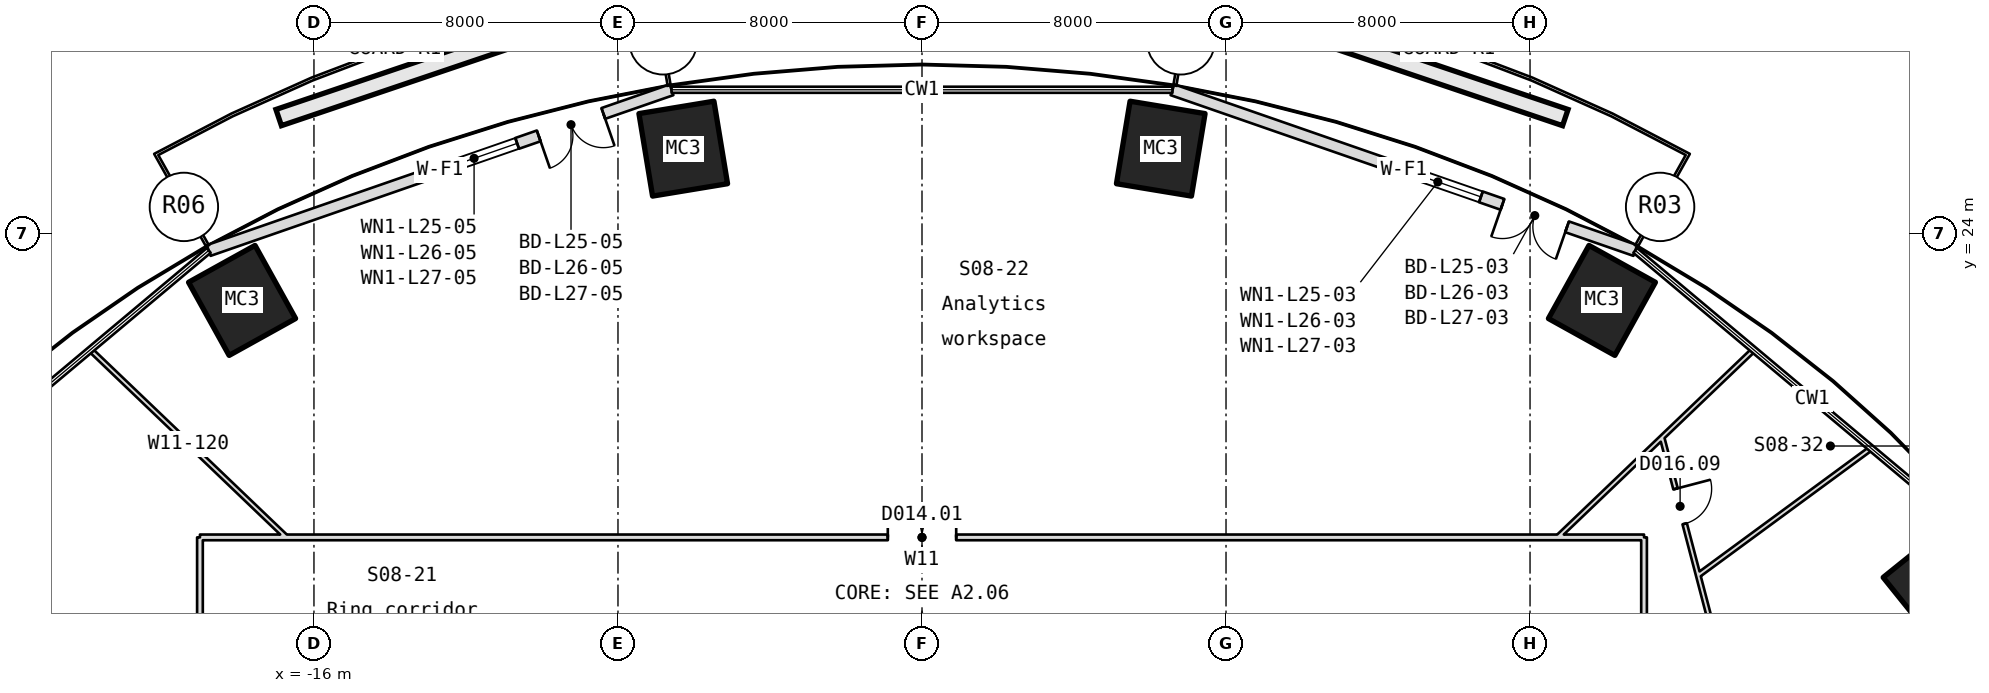
"""IFC4 building model, lengths in metres.
Left out: names, types, materials, properties, quantities, classifications, styles, units other than length and angle.
Written with IfcOpenShell. Run it as: python <this file> out.ifc"""

import sys

from ifc_helpers import new_model, si_unit, direction, frame, frame_2d, origin, origin_2d, place, context, subcontext, project, spatial, rectangle, hollow_rectangle, extrude, element, fill, save


model = new_model("IFC4")
c1 = context("Model", 3, precision=1e-05, world=origin(), true_north=direction((0.0, 1.0)))
c2 = subcontext(c1, "Body", "Model", "MODEL_VIEW")
j1 = project(units=[si_unit("LENGTHUNIT", "METRE"), si_unit("PLANEANGLEUNIT", "RADIAN")], contexts=[c1])
p1 = place(None, origin())
s1 = spatial("IfcSite", under=j1, at=p1, CompositionType="ELEMENT")
p2 = place(p1, origin())
s2 = spatial("IfcBuilding", under=s1, at=p2, CompositionType="ELEMENT")
p3 = place(p2, frame((0.0, 0.0, 120.15)))
s3 = spatial("IfcBuildingStorey", under=s2, at=p3, CompositionType="ELEMENT", Elevation=120.15)
for number, where, z_axis, x_axis in (
    (1, (26.777, 14.857, -0.18), (0.0, 0.0, 1.0), (0.627, -0.779, 0.0)),
    (2, (17.892, 22.235, -0.18), (0.0, 0.0, 1.0), (0.874, -0.485, 0.0)),
    (3, (6.283, 26.228, -0.18), (0.0, 0.0, 1.0), (0.987, -0.163, 0.0)),
    (4, (-6.283, 26.228, -0.18), (0.0, 0.0, 1.0), (0.987, 0.163, 0.0)),
    (5, (-17.892, 22.235, -0.18), (0.0, 0.0, 1.0), (0.874, 0.485, 0.0)),
):
    element("IfcColumn", number, at=place(p3, frame(where, z_axis=z_axis, x_axis=x_axis)), inside=s3, PredefinedType="COLUMN", context=c2, shape_type="SweptSolid", body=[
        extrude(hollow_rectangle(XDim=2.0, YDim=2.2, WallThickness=0.08, at=origin_2d()), origin(), (0.0, 0.0, 1.0), 4.15),
    ])
p4 = place(p3, frame((18.769, 23.549, 0.0), z_axis=(0.0, 0.0, 1.0), x_axis=(-0.944664780262, 0.328037273694, 0.0)))
e6 = element("IfcWall", 6, at=p4, inside=s3, PredefinedType="SOLIDWALL", context=c2, shape_type="SweptSolid", body=[
    extrude(rectangle(XDim=12.892, YDim=0.3, at=frame_2d((6.446, 0.0))), origin(), (0.0, 0.0, 1.0), 3.97),
])
p5 = place(p4, frame((1.9, 0.0, 0.0)))
e7 = element("IfcOpeningElement", 7, at=p5, cuts=e6, PredefinedType="OPENING", context=c2, shape_type="SweptSolid", body=[
    extrude(rectangle(XDim=1.8, YDim=2.4, at=frame_2d((0.9, 1.2))), frame((0.0, 0.16, 0.0), z_axis=(0.0, -1.0, 0.0), x_axis=(1.0, 0.0, 0.0)), (0.0, 0.0, 1.0), 0.32),
])
p6 = place(p4, frame((4.3, 0.0, 0.9)))
e8 = element("IfcOpeningElement", 8, at=p6, cuts=e6, PredefinedType="OPENING", context=c2, shape_type="SweptSolid", body=[
    extrude(rectangle(XDim=2.4, YDim=1.5, at=frame_2d((1.2, 0.75))), frame((0.0, 0.16, 0.0), z_axis=(0.0, -1.0, 0.0), x_axis=(1.0, 0.0, 0.0)), (0.0, 0.0, 1.0), 0.32),
])
p7 = place(p3, frame((-6.591, 27.778, 0.0), z_axis=(0.0, 0.0, 1.0), x_axis=(-0.944664780262, -0.328037273694, 0.0)))
e9 = element("IfcWall", 9, at=p7, inside=s3, PredefinedType="SOLIDWALL", context=c2, shape_type="SweptSolid", body=[
    extrude(rectangle(XDim=12.892, YDim=0.3, at=frame_2d((6.446, 0.0))), origin(), (0.0, 0.0, 1.0), 3.97),
])
p8 = place(p7, frame((1.9, 0.0, 0.0)))
e10 = element("IfcOpeningElement", 10, at=p8, cuts=e9, PredefinedType="OPENING", context=c2, shape_type="SweptSolid", body=[
    extrude(rectangle(XDim=1.8, YDim=2.4, at=frame_2d((0.9, 1.2))), frame((0.0, 0.16, 0.0), z_axis=(0.0, -1.0, 0.0), x_axis=(1.0, 0.0, 0.0)), (0.0, 0.0, 1.0), 0.32),
])
p9 = place(p7, frame((4.3, 0.0, 0.9)))
e11 = element("IfcOpeningElement", 11, at=p9, cuts=e9, PredefinedType="OPENING", context=c2, shape_type="SweptSolid", body=[
    extrude(rectangle(XDim=2.4, YDim=1.5, at=frame_2d((1.2, 0.75))), frame((0.0, 0.16, 0.0), z_axis=(0.0, -1.0, 0.0), x_axis=(1.0, 0.0, 0.0)), (0.0, 0.0, 1.0), 0.32),
])
p10 = place(p3, frame((-19.0, -16.0, 0.0), z_axis=(0.0, 0.0, 1.0), x_axis=(0.0, 1.0, 0.0)))
e12 = element("IfcWall", 12, at=p10, inside=s3, PredefinedType="PARTITIONING", context=c2, shape_type="SweptSolid", body=[
    extrude(rectangle(XDim=32.0, YDim=0.15, at=frame_2d((16.0, 0.0))), origin(), (0.0, 0.0, 1.0), 3.97),
])
p11 = place(p3, frame((-19.0, 16.0, 0.0), z_axis=(0.0, 0.0, 1.0), x_axis=(1.0, 0.0, 0.0)))
e13 = element("IfcWall", 13, at=p11, inside=s3, PredefinedType="PARTITIONING", context=c2, shape_type="SweptSolid", body=[
    extrude(rectangle(XDim=38.0, YDim=0.15, at=frame_2d((19.0, 0.0))), origin(), (0.0, 0.0, 1.0), 3.97),
])
p12 = place(p11, frame((18.1, 0.0, 0.0)))
e14 = element("IfcOpeningElement", 14, at=p12, cuts=e13, PredefinedType="OPENING", context=c2, shape_type="SweptSolid", body=[
    extrude(rectangle(XDim=1.8, YDim=2.1, at=frame_2d((0.9, 1.05))), frame((0.0, 0.085, 0.0), z_axis=(0.0, -1.0, 0.0), x_axis=(1.0, 0.0, 0.0)), (0.0, 0.0, 1.0), 0.17),
])
p13 = place(p3, frame((-16.723, 16.0, 0.0), z_axis=(0.0, 0.0, 1.0), x_axis=(-0.722571333341, 0.691296367872, 0.0)))
e15 = element("IfcWall", 15, at=p13, inside=s3, PredefinedType="PARTITIONING", context=c2, shape_type="SweptSolid", body=[
    extrude(rectangle(XDim=7.143, YDim=0.12, at=frame_2d((3.571, 0.0))), origin(), (0.0, 0.0, 1.0), 3.97),
])
p14 = place(p3, frame((16.723, 16.0, 0.0), z_axis=(0.0, 0.0, 1.0), x_axis=(0.722554998294, 0.69131344153, 0.0)))
e16 = element("IfcWall", 16, at=p14, inside=s3, PredefinedType="PARTITIONING", context=c2, shape_type="SweptSolid", body=[
    extrude(rectangle(XDim=7.143, YDim=0.12, at=frame_2d((3.571, 0.0))), origin(), (0.0, 0.0, 1.0), 3.97),
])
p15 = place(p3, frame((19.0, 16.0, 0.0), z_axis=(0.0, 0.0, 1.0), x_axis=(0.0, -1.0, 0.0)))
e17 = element("IfcWall", 17, at=p15, inside=s3, PredefinedType="PARTITIONING", context=c2, shape_type="SweptSolid", body=[
    extrude(rectangle(XDim=32.0, YDim=0.15, at=frame_2d((16.0, 0.0))), origin(), (0.0, 0.0, 1.0), 3.97),
])
p16 = place(p15, frame((25.851, 0.0, 0.0)))
e18 = element("IfcOpeningElement", 18, at=p16, cuts=e17, PredefinedType="OPENING", context=c2, shape_type="SweptSolid", body=[
    extrude(rectangle(XDim=0.95, YDim=2.1, at=frame_2d((0.475, 1.05))), frame((0.0, 0.085, 0.0), z_axis=(0.0, -1.0, 0.0), x_axis=(1.0, 0.0, 0.0)), (0.0, 0.0, 1.0), 0.17),
])
p17 = place(p15, frame((21.755, 0.0, 0.0)))
e19 = element("IfcOpeningElement", 19, at=p17, cuts=e17, PredefinedType="OPENING", context=c2, shape_type="SweptSolid", body=[
    extrude(rectangle(XDim=0.95, YDim=2.1, at=frame_2d((0.475, 1.05))), frame((0.0, 0.085, 0.0), z_axis=(0.0, -1.0, 0.0), x_axis=(1.0, 0.0, 0.0)), (0.0, 0.0, 1.0), 0.17),
])
p18 = place(p15, frame((9.358, 0.0, 0.0)))
e20 = element("IfcOpeningElement", 20, at=p18, cuts=e17, PredefinedType="OPENING", context=c2, shape_type="SweptSolid", body=[
    extrude(rectangle(XDim=1.8, YDim=2.1, at=frame_2d((0.9, 1.05))), frame((0.0, 0.085, 0.0), z_axis=(0.0, -1.0, 0.0), x_axis=(1.0, 0.0, 0.0)), (0.0, 0.0, 1.0), 0.17),
])
p19 = place(p3, frame((24.976, 18.346, 0.0), z_axis=(0.0, 0.0, 1.0), x_axis=(-0.805952536967, -0.591980158583, 0.0)))
e21 = element("IfcWall", 21, at=p19, inside=s3, PredefinedType="PARTITIONING", context=c2, shape_type="SweptSolid", body=[
    extrude(rectangle(XDim=5.647, YDim=0.12, at=frame_2d((2.823, 0.0))), origin(), (0.0, 0.0, 1.0), 3.97),
])
p20 = place(p3, frame((25.979, -6.173, 0.0), z_axis=(0.0, 0.0, 1.0), x_axis=(-0.253695602942, 0.967284105652, 0.0)))
e22 = element("IfcWall", 22, at=p20, inside=s3, PredefinedType="PARTITIONING", context=c2, shape_type="SweptSolid", body=[
    extrude(rectangle(XDim=25.643, YDim=0.12, at=frame_2d((12.822, 0.0))), origin(), (0.0, 0.0, 1.0), 3.97),
])
p21 = place(p20, frame((3.402, 0.0, 0.0)))
e23 = element("IfcOpeningElement", 23, at=p21, cuts=e22, PredefinedType="OPENING", context=c2, shape_type="SweptSolid", body=[
    extrude(rectangle(XDim=0.95, YDim=2.1, at=frame_2d((0.475, 1.05))), frame((0.0, 0.07, 0.0), z_axis=(0.0, -1.0, 0.0), x_axis=(1.0, 0.0, 0.0)), (0.0, 0.0, 1.0), 0.14),
])
p22 = place(p20, frame((9.992, 0.0, 0.0)))
e24 = element("IfcOpeningElement", 24, at=p22, cuts=e22, PredefinedType="OPENING", context=c2, shape_type="SweptSolid", body=[
    extrude(rectangle(XDim=0.95, YDim=2.1, at=frame_2d((0.475, 1.05))), frame((0.0, 0.07, 0.0), z_axis=(0.0, -1.0, 0.0), x_axis=(1.0, 0.0, 0.0)), (0.0, 0.0, 1.0), 0.14),
])
p23 = place(p20, frame((17.061, 0.0, 0.0)))
e25 = element("IfcOpeningElement", 25, at=p23, cuts=e22, PredefinedType="OPENING", context=c2, shape_type="SweptSolid", body=[
    extrude(rectangle(XDim=0.95, YDim=2.1, at=frame_2d((0.475, 1.05))), frame((0.0, 0.07, 0.0), z_axis=(0.0, -1.0, 0.0), x_axis=(1.0, 0.0, 0.0)), (0.0, 0.0, 1.0), 0.14),
])
p24 = place(p20, frame((23.293, 0.0, 0.0)))
e26 = element("IfcOpeningElement", 26, at=p24, cuts=e22, PredefinedType="OPENING", context=c2, shape_type="SweptSolid", body=[
    extrude(rectangle(XDim=0.95, YDim=2.1, at=frame_2d((0.475, 1.05))), frame((0.0, 0.07, 0.0), z_axis=(0.0, -1.0, 0.0), x_axis=(1.0, 0.0, 0.0)), (0.0, 0.0, 1.0), 0.14),
])
p25 = place(p5, origin())
e27 = element("IfcDoor", 27, at=p25, inside=s3, OperationType="SINGLE_SWING_LEFT", PredefinedType="DOOR", context=c2, shape_type="SweptSolid", body=[
    extrude(rectangle(XDim=1.8, YDim=2.4, at=frame_2d((0.9, 1.2))), frame((0.0, 0.025, 0.0), z_axis=(0.0, -1.0, 0.0), x_axis=(1.0, 0.0, 0.0)), (0.0, 0.0, 1.0), 0.05),
])
fill(e7, e27)
p26 = place(p6, origin())
e28 = element("IfcWindow", 28, at=p26, inside=s3, PartitioningType="SINGLE_PANEL", PredefinedType="WINDOW", context=c2, shape_type="SweptSolid", body=[
    extrude(rectangle(XDim=2.4, YDim=1.5, at=frame_2d((1.2, 0.75))), frame((0.0, 0.03, 0.0), z_axis=(0.0, -1.0, 0.0), x_axis=(1.0, 0.0, 0.0)), (0.0, 0.0, 1.0), 0.06),
])
fill(e8, e28)
p27 = place(p8, origin())
e29 = element("IfcDoor", 29, at=p27, inside=s3, OperationType="SINGLE_SWING_LEFT", PredefinedType="DOOR", context=c2, shape_type="SweptSolid", body=[
    extrude(rectangle(XDim=1.8, YDim=2.4, at=frame_2d((0.9, 1.2))), frame((0.0, 0.025, 0.0), z_axis=(0.0, -1.0, 0.0), x_axis=(1.0, 0.0, 0.0)), (0.0, 0.0, 1.0), 0.05),
])
fill(e10, e29)
p28 = place(p9, origin())
e30 = element("IfcWindow", 30, at=p28, inside=s3, PartitioningType="SINGLE_PANEL", PredefinedType="WINDOW", context=c2, shape_type="SweptSolid", body=[
    extrude(rectangle(XDim=2.4, YDim=1.5, at=frame_2d((1.2, 0.75))), frame((0.0, 0.03, 0.0), z_axis=(0.0, -1.0, 0.0), x_axis=(1.0, 0.0, 0.0)), (0.0, 0.0, 1.0), 0.06),
])
fill(e11, e30)
p29 = place(p12, origin())
e31 = element("IfcDoor", 31, at=p29, inside=s3, OperationType="DOUBLE_DOOR_SINGLE_SWING", PredefinedType="DOOR", context=c2, shape_type="SweptSolid", body=[
    extrude(rectangle(XDim=1.8, YDim=2.1, at=frame_2d((0.9, 1.05))), frame((0.0, 0.025, 0.0), z_axis=(0.0, -1.0, 0.0), x_axis=(1.0, 0.0, 0.0)), (0.0, 0.0, 1.0), 0.05),
])
fill(e14, e31)
p30 = place(p24, frame((0.95, 0.0, 0.0), z_axis=(0.0, 0.0, 1.0), x_axis=(-1.0, 0.0, 0.0)))
e32 = element("IfcDoor", 32, at=p30, inside=s3, OperationType="SINGLE_SWING_LEFT", PredefinedType="DOOR", context=c2, shape_type="SweptSolid", body=[
    extrude(rectangle(XDim=0.95, YDim=2.1, at=frame_2d((0.475, 1.05))), frame((0.0, 0.025, 0.0), z_axis=(0.0, -1.0, 0.0), x_axis=(1.0, 0.0, 0.0)), (0.0, 0.0, 1.0), 0.05),
])
fill(e26, e32)
save(model, sys.argv[1])
